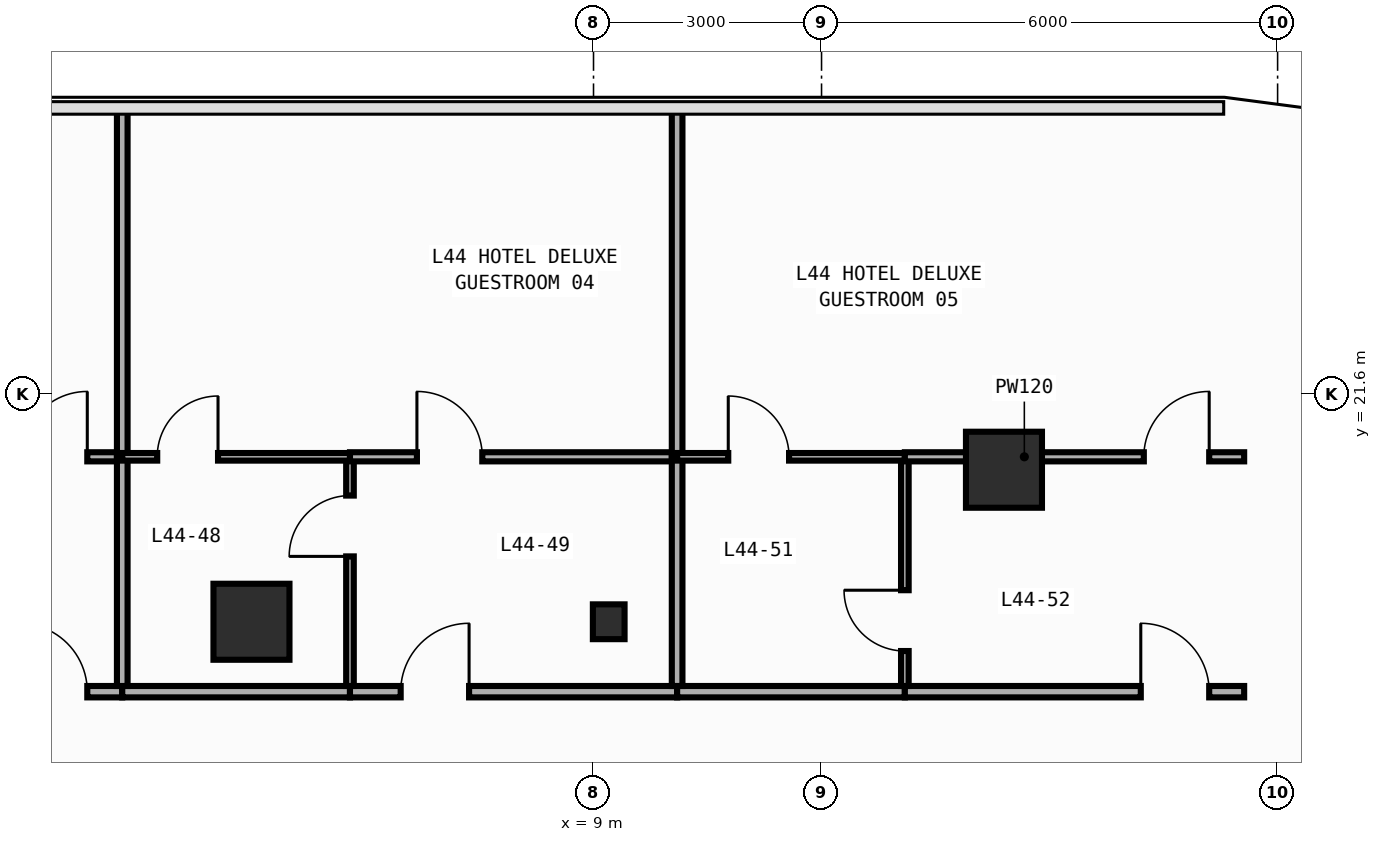
"""IFC4 building model, lengths in metres.
Left out: names, types, materials, properties, quantities, classifications, styles, units other than length and angle.
Written with IfcOpenShell. Run it as: python <this file> out.ifc"""

import sys

from ifc_helpers import new_model, si_unit, direction, frame, frame_2d, origin, origin_2d, place, context, subcontext, project, spatial, rectangle, i_section, extrude, element, fill, save


model = new_model("IFC4")
c1 = context("Model", 3, precision=1e-05, world=origin(), true_north=direction((0.0, 1.0)))
c2 = subcontext(c1, "Body", "Model", "MODEL_VIEW")
j1 = project(units=[si_unit("LENGTHUNIT", "METRE"), si_unit("PLANEANGLEUNIT", "RADIAN")], contexts=[c1])
p1 = place(None, origin())
s1 = spatial("IfcSite", under=j1, at=p1, CompositionType="ELEMENT")
p2 = place(p1, origin())
s2 = spatial("IfcBuilding", under=s1, at=p2, CompositionType="ELEMENT")
p3 = place(p2, frame((0.0, 0.0, 191.6)))
s3 = spatial("IfcBuildingStorey", under=s2, at=p3, CompositionType="ELEMENT", Elevation=191.6)
p4 = place(p3, frame((9.2, 18.6, 0.0), z_axis=(0.0, 0.0, 1.0), x_axis=(1.0, 0.0, 0.0)))
e1 = element("IfcColumn", 1, at=p4, inside=s3, PredefinedType="COLUMN", context=c2, shape_type="SweptSolid", body=[
    extrude(i_section(OverallWidth=0.417, OverallDepth=0.458, WebThickness=0.03, FlangeThickness=0.05, FilletRadius=0.022, at=origin_2d()), origin(), (0.0, 0.0, 1.0), 3.8),
])
for number, where, z_axis, x_axis in (
    (2, (4.5, 18.6, 0.0), (0.0, 0.0, 1.0), (1.0, 0.0, 0.0)),
    (3, (14.4, 20.6, 0.0), (0.0, 0.0, 1.0), (1.0, 0.0, 0.0)),
):
    element("IfcColumn", number, at=place(p3, frame(where, z_axis=z_axis, x_axis=x_axis)), inside=s3, PredefinedType="COLUMN", context=c2, shape_type="SweptSolid", body=[
        extrude(rectangle(XDim=1.0, YDim=1.0, at=origin_2d()), origin(), (0.0, 0.0, 1.0), 3.8),
    ])
p5 = place(p3, frame((-1.444, 17.68, 0.0), z_axis=(0.0, 0.0, 1.0), x_axis=(1.0, 0.0, 0.0)))
e4 = element("IfcWall", 4, at=p5, inside=s3, PredefinedType="PARTITIONING", context=c2, shape_type="SweptSolid", body=[
    extrude(rectangle(XDim=4.244, YDim=0.15, at=frame_2d((2.122, 0.0))), origin(), (0.0, 0.0, 1.0), 3.54),
])
p6 = place(p5, frame((2.884, 0.0, 0.0)))
e5 = element("IfcOpeningElement", 5, at=p6, cuts=e4, PredefinedType="OPENING", context=c2, shape_type="SweptSolid", body=[
    extrude(rectangle(XDim=0.9, YDim=2.15, at=frame_2d((0.45, 1.075))), frame((0.0, 0.085, 0.0), z_axis=(0.0, -1.0, 0.0), x_axis=(1.0, 0.0, 0.0)), (0.0, 0.0, 1.0), 0.17),
])
p7 = place(p3, frame((2.8, 17.68, 0.0), z_axis=(0.0, 0.0, 1.0), x_axis=(1.0, 0.0, 0.0)))
e6 = element("IfcWall", 6, at=p7, inside=s3, PredefinedType="PARTITIONING", context=c2, shape_type="SweptSolid", body=[
    extrude(rectangle(XDim=2.996, YDim=0.15, at=frame_2d((1.498, 0.0))), origin(), (0.0, 0.0, 1.0), 3.54),
])
p8 = place(p3, frame((5.796, 17.68, 0.0), z_axis=(0.0, 0.0, 1.0), x_axis=(1.0, 0.0, 0.0)))
e7 = element("IfcWall", 7, at=p8, inside=s3, PredefinedType="PARTITIONING", context=c2, shape_type="SweptSolid", body=[
    extrude(rectangle(XDim=4.304, YDim=0.15, at=frame_2d((2.152, 0.0))), origin(), (0.0, 0.0, 1.0), 3.54),
])
p9 = place(p8, frame((0.667, 0.0, 0.0)))
e8 = element("IfcOpeningElement", 8, at=p9, cuts=e7, PredefinedType="OPENING", context=c2, shape_type="SweptSolid", body=[
    extrude(rectangle(XDim=0.9, YDim=2.15, at=frame_2d((0.45, 1.075))), frame((0.0, 0.085, 0.0), z_axis=(0.0, -1.0, 0.0), x_axis=(1.0, 0.0, 0.0)), (0.0, 0.0, 1.0), 0.17),
])
p10 = place(p3, frame((10.1, 17.68, 0.0), z_axis=(0.0, 0.0, 1.0), x_axis=(1.0, 0.0, 0.0)))
e9 = element("IfcWall", 9, at=p10, inside=s3, PredefinedType="PARTITIONING", context=c2, shape_type="SweptSolid", body=[
    extrude(rectangle(XDim=2.996, YDim=0.15, at=frame_2d((1.498, 0.0))), origin(), (0.0, 0.0, 1.0), 3.54),
])
p11 = place(p3, frame((13.096, 17.68, 0.0), z_axis=(0.0, 0.0, 1.0), x_axis=(1.0, 0.0, 0.0)))
e10 = element("IfcWall", 10, at=p11, inside=s3, PredefinedType="PARTITIONING", context=c2, shape_type="SweptSolid", body=[
    extrude(rectangle(XDim=4.464, YDim=0.15, at=frame_2d((2.232, 0.0))), origin(), (0.0, 0.0, 1.0), 3.54),
])
p12 = place(p11, frame((3.104, 0.0, 0.0)))
e11 = element("IfcOpeningElement", 11, at=p12, cuts=e10, PredefinedType="OPENING", context=c2, shape_type="SweptSolid", body=[
    extrude(rectangle(XDim=0.9, YDim=2.15, at=frame_2d((0.45, 1.075))), frame((0.0, 0.085, 0.0), z_axis=(0.0, -1.0, 0.0), x_axis=(1.0, 0.0, 0.0)), (0.0, 0.0, 1.0), 0.17),
])
p13 = place(p3, frame((-1.444, 20.77, 0.0), z_axis=(0.0, 0.0, 1.0), x_axis=(1.0, 0.0, 0.0)))
e12 = element("IfcWall", 12, at=p13, inside=s3, PredefinedType="PARTITIONING", context=c2, shape_type="SweptSolid", body=[
    extrude(rectangle(XDim=4.244, YDim=0.12, at=frame_2d((2.122, 0.0))), origin(), (0.0, 0.0, 1.0), 3.54),
])
p14 = place(p13, frame((2.924, 0.0, 0.0)))
e13 = element("IfcOpeningElement", 13, at=p14, cuts=e12, PredefinedType="OPENING", context=c2, shape_type="SweptSolid", body=[
    extrude(rectangle(XDim=0.86, YDim=2.15, at=frame_2d((0.43, 1.075))), frame((0.0, 0.07, 0.0), z_axis=(0.0, -1.0, 0.0), x_axis=(1.0, 0.0, 0.0)), (0.0, 0.0, 1.0), 0.14),
])
p15 = place(p3, frame((2.8, 17.755, 0.0), z_axis=(0.0, 0.0, 1.0), x_axis=(0.0, 1.0, 0.0)))
e14 = element("IfcWall", 14, at=p15, inside=s3, PredefinedType="PARTITIONING", context=c2, shape_type="SweptSolid", body=[
    extrude(rectangle(XDim=3.015, YDim=0.14, at=frame_2d((1.508, 0.0))), origin(), (0.0, 0.0, 1.0), 3.54),
])
p16 = place(p3, frame((2.8, 20.77, 0.0), z_axis=(0.0, 0.0, 1.0), x_axis=(0.0, 1.0, 0.0)))
e15 = element("IfcWall", 15, at=p16, inside=s3, PredefinedType="PARTITIONING", context=c2, shape_type="SweptSolid", body=[
    extrude(rectangle(XDim=4.585, YDim=0.14, at=frame_2d((2.292, 0.0))), origin(), (0.0, 0.0, 1.0), 3.54),
])
p17 = place(p3, frame((5.796, 17.755, 0.0), z_axis=(0.0, 0.0, 1.0), x_axis=(0.0, 1.0, 0.0)))
e16 = element("IfcWall", 16, at=p17, inside=s3, PredefinedType="PARTITIONING", context=c2, shape_type="SweptSolid", body=[
    extrude(rectangle(XDim=2.965, YDim=0.1, at=frame_2d((1.482, 0.0))), origin(), (0.0, 0.0, 1.0), 3.54),
])
p18 = place(p17, frame((1.705, 0.0, 0.0)))
e17 = element("IfcOpeningElement", 17, at=p18, cuts=e16, PredefinedType="OPENING", context=c2, shape_type="SweptSolid", body=[
    extrude(rectangle(XDim=0.8, YDim=2.1, at=frame_2d((0.4, 1.05))), frame((0.0, 0.06, 0.0), z_axis=(0.0, -1.0, 0.0), x_axis=(1.0, 0.0, 0.0)), (0.0, 0.0, 1.0), 0.12),
])
p19 = place(p3, frame((2.8, 20.77, 0.0), z_axis=(0.0, 0.0, 1.0), x_axis=(1.0, 0.0, 0.0)))
e18 = element("IfcWall", 18, at=p19, inside=s3, PredefinedType="PARTITIONING", context=c2, shape_type="SweptSolid", body=[
    extrude(rectangle(XDim=2.996, YDim=0.1, at=frame_2d((1.498, 0.0))), origin(), (0.0, 0.0, 1.0), 3.54),
])
p20 = place(p19, frame((0.46, 0.0, 0.0)))
e19 = element("IfcOpeningElement", 19, at=p20, cuts=e18, PredefinedType="OPENING", context=c2, shape_type="SweptSolid", body=[
    extrude(rectangle(XDim=0.8, YDim=2.1, at=frame_2d((0.4, 1.05))), frame((0.0, 0.06, 0.0), z_axis=(0.0, -1.0, 0.0), x_axis=(1.0, 0.0, 0.0)), (0.0, 0.0, 1.0), 0.12),
])
p21 = place(p3, frame((5.796, 20.77, 0.0), z_axis=(0.0, 0.0, 1.0), x_axis=(1.0, 0.0, 0.0)))
e20 = element("IfcWall", 20, at=p21, inside=s3, PredefinedType="PARTITIONING", context=c2, shape_type="SweptSolid", body=[
    extrude(rectangle(XDim=4.304, YDim=0.12, at=frame_2d((2.152, 0.0))), origin(), (0.0, 0.0, 1.0), 3.54),
])
p22 = place(p21, frame((0.881, 0.0, 0.0)))
e21 = element("IfcOpeningElement", 21, at=p22, cuts=e20, PredefinedType="OPENING", context=c2, shape_type="SweptSolid", body=[
    extrude(rectangle(XDim=0.86, YDim=2.15, at=frame_2d((0.43, 1.075))), frame((0.0, 0.07, 0.0), z_axis=(0.0, -1.0, 0.0), x_axis=(1.0, 0.0, 0.0)), (0.0, 0.0, 1.0), 0.14),
])
p23 = place(p3, frame((10.1, 17.755, 0.0), z_axis=(0.0, 0.0, 1.0), x_axis=(0.0, 1.0, 0.0)))
e22 = element("IfcWall", 22, at=p23, inside=s3, PredefinedType="PARTITIONING", context=c2, shape_type="SweptSolid", body=[
    extrude(rectangle(XDim=3.015, YDim=0.14, at=frame_2d((1.508, 0.0))), origin(), (0.0, 0.0, 1.0), 3.54),
])
p24 = place(p3, frame((10.1, 20.77, 0.0), z_axis=(0.0, 0.0, 1.0), x_axis=(0.0, 1.0, 0.0)))
e23 = element("IfcWall", 23, at=p24, inside=s3, PredefinedType="PARTITIONING", context=c2, shape_type="SweptSolid", body=[
    extrude(rectangle(XDim=4.585, YDim=0.14, at=frame_2d((2.292, 0.0))), origin(), (0.0, 0.0, 1.0), 3.54),
])
p25 = place(p3, frame((13.096, 17.755, 0.0), z_axis=(0.0, 0.0, 1.0), x_axis=(0.0, 1.0, 0.0)))
e24 = element("IfcWall", 24, at=p25, inside=s3, PredefinedType="PARTITIONING", context=c2, shape_type="SweptSolid", body=[
    extrude(rectangle(XDim=2.965, YDim=0.1, at=frame_2d((1.482, 0.0))), origin(), (0.0, 0.0, 1.0), 3.54),
])
p26 = place(p25, frame((0.46, 0.0, 0.0)))
e25 = element("IfcOpeningElement", 25, at=p26, cuts=e24, PredefinedType="OPENING", context=c2, shape_type="SweptSolid", body=[
    extrude(rectangle(XDim=0.8, YDim=2.1, at=frame_2d((0.4, 1.05))), frame((0.0, 0.06, 0.0), z_axis=(0.0, -1.0, 0.0), x_axis=(1.0, 0.0, 0.0)), (0.0, 0.0, 1.0), 0.12),
])
p27 = place(p3, frame((10.1, 20.77, 0.0), z_axis=(0.0, 0.0, 1.0), x_axis=(1.0, 0.0, 0.0)))
e26 = element("IfcWall", 26, at=p27, inside=s3, PredefinedType="PARTITIONING", context=c2, shape_type="SweptSolid", body=[
    extrude(rectangle(XDim=2.996, YDim=0.1, at=frame_2d((1.498, 0.0))), origin(), (0.0, 0.0, 1.0), 3.54),
])
p28 = place(p27, frame((0.673, 0.0, 0.0)))
e27 = element("IfcOpeningElement", 27, at=p28, cuts=e26, PredefinedType="OPENING", context=c2, shape_type="SweptSolid", body=[
    extrude(rectangle(XDim=0.8, YDim=2.1, at=frame_2d((0.4, 1.05))), frame((0.0, 0.06, 0.0), z_axis=(0.0, -1.0, 0.0), x_axis=(1.0, 0.0, 0.0)), (0.0, 0.0, 1.0), 0.12),
])
p29 = place(p3, frame((13.096, 20.77, 0.0), z_axis=(0.0, 0.0, 1.0), x_axis=(1.0, 0.0, 0.0)))
e28 = element("IfcWall", 28, at=p29, inside=s3, PredefinedType="PARTITIONING", context=c2, shape_type="SweptSolid", body=[
    extrude(rectangle(XDim=4.464, YDim=0.12, at=frame_2d((2.232, 0.0))), origin(), (0.0, 0.0, 1.0), 3.54),
])
p30 = place(p29, frame((3.144, 0.0, 0.0)))
e29 = element("IfcOpeningElement", 29, at=p30, cuts=e28, PredefinedType="OPENING", context=c2, shape_type="SweptSolid", body=[
    extrude(rectangle(XDim=0.86, YDim=2.15, at=frame_2d((0.43, 1.075))), frame((0.0, 0.07, 0.0), z_axis=(0.0, -1.0, 0.0), x_axis=(1.0, 0.0, 0.0)), (0.0, 0.0, 1.0), 0.14),
])
p31 = place(p6, origin())
e30 = element("IfcDoor", 30, at=p31, inside=s3, OperationType="SINGLE_SWING_LEFT", PredefinedType="DOOR", context=c2, shape_type="SweptSolid", body=[
    extrude(rectangle(XDim=0.9, YDim=2.15, at=frame_2d((0.45, 1.075))), frame((0.0, 0.025, 0.0), z_axis=(0.0, -1.0, 0.0), x_axis=(1.0, 0.0, 0.0)), (0.0, 0.0, 1.0), 0.05),
])
fill(e5, e30)
p32 = place(p9, origin())
e31 = element("IfcDoor", 31, at=p32, inside=s3, OperationType="SINGLE_SWING_RIGHT", PredefinedType="DOOR", context=c2, shape_type="SweptSolid", body=[
    extrude(rectangle(XDim=0.9, YDim=2.15, at=frame_2d((0.45, 1.075))), frame((0.0, 0.025, 0.0), z_axis=(0.0, -1.0, 0.0), x_axis=(1.0, 0.0, 0.0)), (0.0, 0.0, 1.0), 0.05),
])
fill(e8, e31)
p33 = place(p12, origin())
e32 = element("IfcDoor", 32, at=p33, inside=s3, OperationType="SINGLE_SWING_LEFT", PredefinedType="DOOR", context=c2, shape_type="SweptSolid", body=[
    extrude(rectangle(XDim=0.9, YDim=2.15, at=frame_2d((0.45, 1.075))), frame((0.0, 0.025, 0.0), z_axis=(0.0, -1.0, 0.0), x_axis=(1.0, 0.0, 0.0)), (0.0, 0.0, 1.0), 0.05),
])
fill(e11, e32)
p34 = place(p14, origin())
e33 = element("IfcDoor", 33, at=p34, inside=s3, OperationType="SINGLE_SWING_RIGHT", PredefinedType="DOOR", context=c2, shape_type="SweptSolid", body=[
    extrude(rectangle(XDim=0.86, YDim=2.15, at=frame_2d((0.43, 1.075))), frame((0.0, 0.025, 0.0), z_axis=(0.0, -1.0, 0.0), x_axis=(1.0, 0.0, 0.0)), (0.0, 0.0, 1.0), 0.05),
])
fill(e13, e33)
p35 = place(p18, origin())
e34 = element("IfcDoor", 34, at=p35, inside=s3, OperationType="SINGLE_SWING_LEFT", PredefinedType="DOOR", context=c2, shape_type="SweptSolid", body=[
    extrude(rectangle(XDim=0.8, YDim=2.1, at=frame_2d((0.4, 1.05))), frame((0.0, 0.025, 0.0), z_axis=(0.0, -1.0, 0.0), x_axis=(1.0, 0.0, 0.0)), (0.0, 0.0, 1.0), 0.05),
])
fill(e17, e34)
p36 = place(p20, origin())
e35 = element("IfcDoor", 35, at=p36, inside=s3, OperationType="SINGLE_SWING_RIGHT", PredefinedType="DOOR", context=c2, shape_type="SweptSolid", body=[
    extrude(rectangle(XDim=0.8, YDim=2.1, at=frame_2d((0.4, 1.05))), frame((0.0, 0.025, 0.0), z_axis=(0.0, -1.0, 0.0), x_axis=(1.0, 0.0, 0.0)), (0.0, 0.0, 1.0), 0.05),
])
fill(e19, e35)
p37 = place(p22, origin())
e36 = element("IfcDoor", 36, at=p37, inside=s3, OperationType="SINGLE_SWING_LEFT", PredefinedType="DOOR", context=c2, shape_type="SweptSolid", body=[
    extrude(rectangle(XDim=0.86, YDim=2.15, at=frame_2d((0.43, 1.075))), frame((0.0, 0.025, 0.0), z_axis=(0.0, -1.0, 0.0), x_axis=(1.0, 0.0, 0.0)), (0.0, 0.0, 1.0), 0.05),
])
fill(e21, e36)
p38 = place(p26, origin())
e37 = element("IfcDoor", 37, at=p38, inside=s3, OperationType="SINGLE_SWING_RIGHT", PredefinedType="DOOR", context=c2, shape_type="SweptSolid", body=[
    extrude(rectangle(XDim=0.8, YDim=2.1, at=frame_2d((0.4, 1.05))), frame((0.0, 0.025, 0.0), z_axis=(0.0, -1.0, 0.0), x_axis=(1.0, 0.0, 0.0)), (0.0, 0.0, 1.0), 0.05),
])
fill(e25, e37)
p39 = place(p28, origin())
e38 = element("IfcDoor", 38, at=p39, inside=s3, OperationType="SINGLE_SWING_LEFT", PredefinedType="DOOR", context=c2, shape_type="SweptSolid", body=[
    extrude(rectangle(XDim=0.8, YDim=2.1, at=frame_2d((0.4, 1.05))), frame((0.0, 0.025, 0.0), z_axis=(0.0, -1.0, 0.0), x_axis=(1.0, 0.0, 0.0)), (0.0, 0.0, 1.0), 0.05),
])
fill(e27, e38)
p40 = place(p30, origin())
e39 = element("IfcDoor", 39, at=p40, inside=s3, OperationType="SINGLE_SWING_RIGHT", PredefinedType="DOOR", context=c2, shape_type="SweptSolid", body=[
    extrude(rectangle(XDim=0.86, YDim=2.15, at=frame_2d((0.43, 1.075))), frame((0.0, 0.025, 0.0), z_axis=(0.0, -1.0, 0.0), x_axis=(1.0, 0.0, 0.0)), (0.0, 0.0, 1.0), 0.05),
])
fill(e29, e39)
save(model, sys.argv[1])
